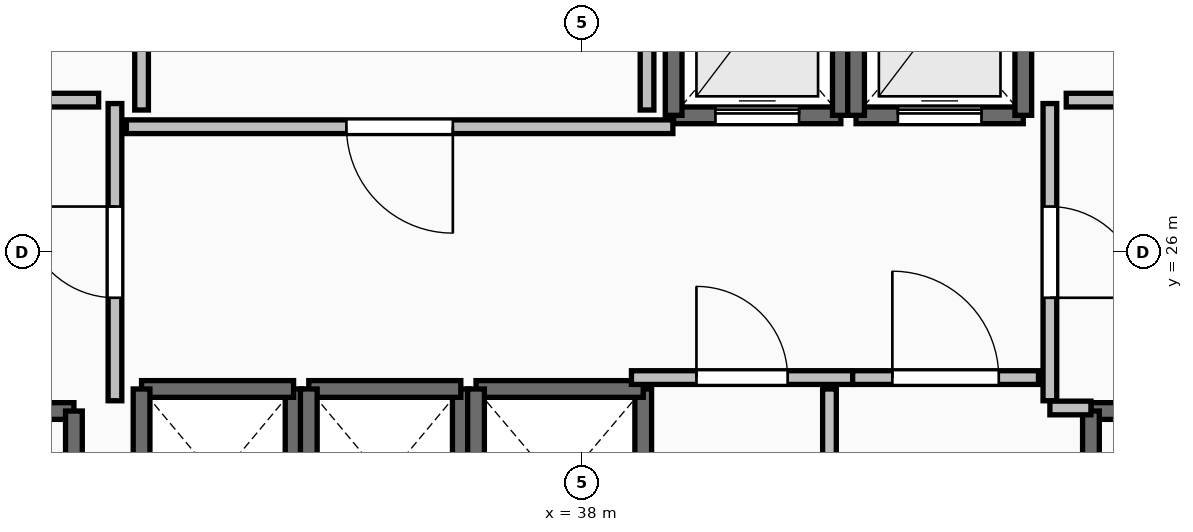
"""IFC4 building model, lengths in metres.
Left out: names, types, materials, properties, quantities, classifications, styles, units other than length and angle.
Written with IfcOpenShell. Run it as: python <this file> out.ifc"""

import sys

from ifc_helpers import new_model, si_unit, direction, frame, frame_2d, origin, place, context, subcontext, project, spatial, rectangle, extrude, element, fill, save


model = new_model("IFC4")
c1 = context("Model", 3, precision=1e-05, world=origin(), true_north=direction((0.0, 1.0)))
c2 = subcontext(c1, "Body", "Model", "MODEL_VIEW")
j1 = project(units=[si_unit("LENGTHUNIT", "METRE"), si_unit("PLANEANGLEUNIT", "RADIAN")], contexts=[c1])
p1 = place(None, origin())
s1 = spatial("IfcSite", under=j1, at=p1, CompositionType="ELEMENT")
p2 = place(p1, origin())
s2 = spatial("IfcBuilding", under=s1, at=p2, CompositionType="ELEMENT")
p3 = place(p2, frame((0.0, 0.0, 224.95)))
s3 = spatial("IfcBuildingStorey", under=s2, at=p3, CompositionType="ELEMENT", Elevation=224.95)
p4 = place(p3, frame((27.94, 23.91, 0.0), z_axis=(0.0, 0.0, 1.0), x_axis=(1.0, 0.0, 0.0)))
e1 = element("IfcWall", 1, at=p4, inside=s3, PredefinedType="SOLIDWALL", context=c2, shape_type="SweptSolid", body=[
    extrude(rectangle(XDim=3.37, YDim=0.22, at=frame_2d((1.685, 0.0))), origin(), (0.0, 0.0, 1.0), 4.5),
])
p5 = place(p4, frame((1.135, 0.0, 0.0)))
e2 = element("IfcOpeningElement", 2, at=p5, cuts=e1, PredefinedType="OPENING", context=c2, shape_type="SweptSolid", body=[
    extrude(rectangle(XDim=1.1, YDim=2.15, at=frame_2d((0.55, 1.075))), frame((0.0, 0.125, 0.0), z_axis=(0.0, -1.0, 0.0), x_axis=(1.0, 0.0, 0.0)), (0.0, 0.0, 1.0), 0.25),
])
p6 = place(p3, frame((31.31, 23.91, 0.0), z_axis=(0.0, 0.0, 1.0), x_axis=(0.0, -1.0, 0.0)))
e3 = element("IfcWall", 3, at=p6, inside=s3, PredefinedType="SOLIDWALL", context=c2, shape_type="SweptSolid", body=[
    extrude(rectangle(XDim=7.42, YDim=0.22, at=frame_2d((3.71, 0.0))), origin(), (0.0, 0.0, 1.0), 4.5),
])
p7 = place(p3, frame((44.69, 23.91, 0.0), z_axis=(0.0, 0.0, 1.0), x_axis=(1.0, 0.0, 0.0)))
e4 = element("IfcWall", 4, at=p7, inside=s3, PredefinedType="SOLIDWALL", context=c2, shape_type="SweptSolid", body=[
    extrude(rectangle(XDim=3.37, YDim=0.22, at=frame_2d((1.685, 0.0))), origin(), (0.0, 0.0, 1.0), 4.5),
])
p8 = place(p7, frame((1.135, 0.0, 0.0)))
e5 = element("IfcOpeningElement", 5, at=p8, cuts=e4, PredefinedType="OPENING", context=c2, shape_type="SweptSolid", body=[
    extrude(rectangle(XDim=1.1, YDim=2.15, at=frame_2d((0.55, 1.075))), frame((0.0, 0.125, 0.0), z_axis=(0.0, -1.0, 0.0), x_axis=(1.0, 0.0, 0.0)), (0.0, 0.0, 1.0), 0.25),
])
p9 = place(p3, frame((44.69, 16.49, 0.0), z_axis=(0.0, 0.0, 1.0), x_axis=(0.0, 1.0, 0.0)))
e6 = element("IfcWall", 6, at=p9, inside=s3, PredefinedType="SOLIDWALL", context=c2, shape_type="SweptSolid", body=[
    extrude(rectangle(XDim=7.42, YDim=0.22, at=frame_2d((3.71, 0.0))), origin(), (0.0, 0.0, 1.0), 4.5),
])
p10 = place(p3, frame((34.2, 21.8, 0.0), z_axis=(0.0, 0.0, 1.0), x_axis=(0.0, 1.0, 0.0)))
e7 = element("IfcWall", 7, at=p10, inside=s3, PredefinedType="SOLIDWALL", context=c2, shape_type="SweptSolid", body=[
    extrude(rectangle(XDim=2.4, YDim=0.22, at=frame_2d((1.2, 0.0))), origin(), (0.0, 0.0, 1.0), 4.5),
])
p11 = place(p3, frame((34.2, 24.2, 0.0), z_axis=(0.0, 0.0, 1.0), x_axis=(-1.0, 0.0, 0.0)))
e8 = element("IfcWall", 8, at=p11, inside=s3, PredefinedType="SOLIDWALL", context=c2, shape_type="SweptSolid", body=[
    extrude(rectangle(XDim=2.0, YDim=0.22, at=frame_2d((1.0, 0.0))), origin(), (0.0, 0.0, 1.0), 4.5),
])
for number, where, z_axis, x_axis in (
    (9, (32.2, 24.2, 0.0), (0.0, 0.0, 1.0), (0.0, -1.0, 0.0)),
    (10, (36.4, 21.8, 0.0), (0.0, 0.0, 1.0), (0.0, 1.0, 0.0)),
):
    element("IfcWall", number, at=place(p3, frame(where, z_axis=z_axis, x_axis=x_axis)), inside=s3, PredefinedType="SOLIDWALL", context=c2, shape_type="SweptSolid", body=[
        extrude(rectangle(XDim=2.4, YDim=0.22, at=frame_2d((1.2, 0.0))), origin(), (0.0, 0.0, 1.0), 4.5),
    ])
p12 = place(p3, frame((36.4, 24.2, 0.0), z_axis=(0.0, 0.0, 1.0), x_axis=(-1.0, 0.0, 0.0)))
e11 = element("IfcWall", 11, at=p12, inside=s3, PredefinedType="SOLIDWALL", context=c2, shape_type="SweptSolid", body=[
    extrude(rectangle(XDim=2.0, YDim=0.22, at=frame_2d((1.0, 0.0))), origin(), (0.0, 0.0, 1.0), 4.5),
])
p13 = place(p3, frame((34.4, 24.2, 0.0), z_axis=(0.0, 0.0, 1.0), x_axis=(0.0, -1.0, 0.0)))
e12 = element("IfcWall", 12, at=p13, inside=s3, PredefinedType="SOLIDWALL", context=c2, shape_type="SweptSolid", body=[
    extrude(rectangle(XDim=2.4, YDim=0.22, at=frame_2d((1.2, 0.0))), origin(), (0.0, 0.0, 1.0), 4.5),
])
p14 = place(p3, frame((38.8, 21.6, 0.0), z_axis=(0.0, 0.0, 1.0), x_axis=(0.0, 1.0, 0.0)))
e13 = element("IfcWall", 13, at=p14, inside=s3, PredefinedType="SOLIDWALL", context=c2, shape_type="SweptSolid", body=[
    extrude(rectangle(XDim=2.6, YDim=0.22, at=frame_2d((1.3, 0.0))), origin(), (0.0, 0.0, 1.0), 4.5),
])
p15 = place(p3, frame((38.8, 24.2, 0.0), z_axis=(0.0, 0.0, 1.0), x_axis=(-1.0, 0.0, 0.0)))
e14 = element("IfcWall", 14, at=p15, inside=s3, PredefinedType="SOLIDWALL", context=c2, shape_type="SweptSolid", body=[
    extrude(rectangle(XDim=2.2, YDim=0.22, at=frame_2d((1.1, 0.0))), origin(), (0.0, 0.0, 1.0), 4.5),
])
p16 = place(p3, frame((36.6, 24.2, 0.0), z_axis=(0.0, 0.0, 1.0), x_axis=(0.0, -1.0, 0.0)))
e15 = element("IfcWall", 15, at=p16, inside=s3, PredefinedType="SOLIDWALL", context=c2, shape_type="SweptSolid", body=[
    extrude(rectangle(XDim=2.6, YDim=0.22, at=frame_2d((1.3, 0.0))), origin(), (0.0, 0.0, 1.0), 4.5),
])
p17 = place(p3, frame((39.2, 27.8, 0.0), z_axis=(0.0, 0.0, 1.0), x_axis=(1.0, 0.0, 0.0)))
e16 = element("IfcWall", 16, at=p17, inside=s3, PredefinedType="SOLIDWALL", context=c2, shape_type="SweptSolid", body=[
    extrude(rectangle(XDim=2.2, YDim=0.22, at=frame_2d((1.1, 0.0))), origin(), (0.0, 0.0, 1.0), 4.5),
])
p18 = place(p17, frame((0.55, 0.0, 0.0)))
e17 = element("IfcOpeningElement", 17, at=p18, cuts=e16, PredefinedType="OPENING", context=c2, shape_type="SweptSolid", body=[
    extrude(rectangle(XDim=1.1, YDim=2.2, at=frame_2d((0.55, 1.1))), frame((0.0, 0.125, 0.0), z_axis=(0.0, -1.0, 0.0), x_axis=(1.0, 0.0, 0.0)), (0.0, 0.0, 1.0), 0.25),
])
for number, where, z_axis, x_axis in (
    (18, (41.4, 27.8, 0.0), (0.0, 0.0, 1.0), (0.0, 1.0, 0.0)),
    (19, (39.2, 30.4, 0.0), (0.0, 0.0, 1.0), (0.0, -1.0, 0.0)),
):
    element("IfcWall", number, at=place(p3, frame(where, z_axis=z_axis, x_axis=x_axis)), inside=s3, PredefinedType="SOLIDWALL", context=c2, shape_type="SweptSolid", body=[
        extrude(rectangle(XDim=2.6, YDim=0.22, at=frame_2d((1.3, 0.0))), origin(), (0.0, 0.0, 1.0), 4.5),
    ])
p19 = place(p3, frame((41.6, 27.8, 0.0), z_axis=(0.0, 0.0, 1.0), x_axis=(1.0, 0.0, 0.0)))
e20 = element("IfcWall", 20, at=p19, inside=s3, PredefinedType="SOLIDWALL", context=c2, shape_type="SweptSolid", body=[
    extrude(rectangle(XDim=2.2, YDim=0.22, at=frame_2d((1.1, 0.0))), origin(), (0.0, 0.0, 1.0), 4.5),
])
p20 = place(p19, frame((0.55, 0.0, 0.0)))
e21 = element("IfcOpeningElement", 21, at=p20, cuts=e20, PredefinedType="OPENING", context=c2, shape_type="SweptSolid", body=[
    extrude(rectangle(XDim=1.1, YDim=2.2, at=frame_2d((0.55, 1.1))), frame((0.0, 0.125, 0.0), z_axis=(0.0, -1.0, 0.0), x_axis=(1.0, 0.0, 0.0)), (0.0, 0.0, 1.0), 0.25),
])
for number, where, z_axis, x_axis in (
    (22, (43.8, 27.8, 0.0), (0.0, 0.0, 1.0), (0.0, 1.0, 0.0)),
    (23, (41.6, 30.4, 0.0), (0.0, 0.0, 1.0), (0.0, -1.0, 0.0)),
):
    element("IfcWall", number, at=place(p3, frame(where, z_axis=z_axis, x_axis=x_axis)), inside=s3, PredefinedType="SOLIDWALL", context=c2, shape_type="SweptSolid", body=[
        extrude(rectangle(XDim=2.6, YDim=0.22, at=frame_2d((1.3, 0.0))), origin(), (0.0, 0.0, 1.0), 4.5),
    ])
p21 = place(p3, frame((31.85, 24.045, 0.0), z_axis=(0.0, 0.0, 1.0), x_axis=(0.0, 1.0, 0.0)))
e24 = element("IfcWall", 24, at=p21, inside=s3, PredefinedType="PARTITIONING", context=c2, shape_type="SweptSolid", body=[
    extrude(rectangle(XDim=3.91, YDim=0.18, at=frame_2d((1.955, 0.0))), origin(), (0.0, 0.0, 1.0), 4.5),
])
p22 = place(p21, frame((1.355, 0.0, 0.0)))
e25 = element("IfcOpeningElement", 25, at=p22, cuts=e24, PredefinedType="OPENING", context=c2, shape_type="SweptSolid", body=[
    extrude(rectangle(XDim=1.2, YDim=2.15, at=frame_2d((0.6, 1.075))), frame((0.0, 0.105, 0.0), z_axis=(0.0, -1.0, 0.0), x_axis=(1.0, 0.0, 0.0)), (0.0, 0.0, 1.0), 0.21),
])
p23 = place(p3, frame((44.15, 27.955, 0.0), z_axis=(0.0, 0.0, 1.0), x_axis=(0.0, -1.0, 0.0)))
e26 = element("IfcWall", 26, at=p23, inside=s3, PredefinedType="PARTITIONING", context=c2, shape_type="SweptSolid", body=[
    extrude(rectangle(XDim=3.91, YDim=0.18, at=frame_2d((1.955, 0.0))), origin(), (0.0, 0.0, 1.0), 4.5),
])
p24 = place(p23, frame((1.355, 0.0, 0.0)))
e27 = element("IfcOpeningElement", 27, at=p24, cuts=e26, PredefinedType="OPENING", context=c2, shape_type="SweptSolid", body=[
    extrude(rectangle(XDim=1.2, YDim=2.15, at=frame_2d((0.6, 1.075))), frame((0.0, 0.105, 0.0), z_axis=(0.0, -1.0, 0.0), x_axis=(1.0, 0.0, 0.0)), (0.0, 0.0, 1.0), 0.21),
])
p25 = place(p3, frame((44.15, 23.95, 0.0), z_axis=(0.0, 0.0, 1.0), x_axis=(1.0, 0.0, 0.0)))
e28 = element("IfcWall", 28, at=p25, inside=s3, PredefinedType="PARTITIONING", context=c2, shape_type="SweptSolid", body=[
    extrude(rectangle(XDim=0.54, YDim=0.18, at=frame_2d((0.27, 0.0))), origin(), (0.0, 0.0, 1.0), 4.5),
])
p26 = place(p3, frame((38.645, 24.35, 0.0), z_axis=(0.0, 0.0, 1.0), x_axis=(1.0, 0.0, 0.0)))
e29 = element("IfcWall", 29, at=p26, inside=s3, PredefinedType="PARTITIONING", context=c2, shape_type="SweptSolid", body=[
    extrude(rectangle(XDim=2.91, YDim=0.18, at=frame_2d((1.455, 0.0))), origin(), (0.0, 0.0, 1.0), 4.5),
])
p27 = place(p26, frame((0.855, 0.0, 0.0)))
e30 = element("IfcOpeningElement", 30, at=p27, cuts=e29, PredefinedType="OPENING", context=c2, shape_type="SweptSolid", body=[
    extrude(rectangle(XDim=1.2, YDim=2.15, at=frame_2d((0.6, 1.075))), frame((0.0, 0.105, 0.0), z_axis=(0.0, -1.0, 0.0), x_axis=(1.0, 0.0, 0.0)), (0.0, 0.0, 1.0), 0.21),
])
p28 = place(p3, frame((41.555, 24.35, 0.0), z_axis=(0.0, 0.0, 1.0), x_axis=(1.0, 0.0, 0.0)))
e31 = element("IfcWall", 31, at=p28, inside=s3, PredefinedType="PARTITIONING", context=c2, shape_type="SweptSolid", body=[
    extrude(rectangle(XDim=2.445, YDim=0.18, at=frame_2d((1.223, 0.0))), origin(), (0.0, 0.0, 1.0), 4.5),
])
p29 = place(p28, frame((0.522, 0.0, 0.0)))
e32 = element("IfcOpeningElement", 32, at=p29, cuts=e31, PredefinedType="OPENING", context=c2, shape_type="SweptSolid", body=[
    extrude(rectangle(XDim=1.4, YDim=2.2, at=frame_2d((0.7, 1.1))), frame((0.0, 0.105, 0.0), z_axis=(0.0, -1.0, 0.0), x_axis=(1.0, 0.0, 0.0)), (0.0, 0.0, 1.0), 0.21),
])
p30 = place(p3, frame((39.19, 27.65, 0.0), z_axis=(0.0, 0.0, 1.0), x_axis=(-1.0, 0.0, 0.0)))
e33 = element("IfcWall", 33, at=p30, inside=s3, PredefinedType="PARTITIONING", context=c2, shape_type="SweptSolid", body=[
    extrude(rectangle(XDim=7.19, YDim=0.18, at=frame_2d((3.595, 0.0))), origin(), (0.0, 0.0, 1.0), 4.5),
])
p31 = place(p30, frame((2.895, 0.0, 0.0)))
e34 = element("IfcOpeningElement", 34, at=p31, cuts=e33, PredefinedType="OPENING", context=c2, shape_type="SweptSolid", body=[
    extrude(rectangle(XDim=1.4, YDim=2.2, at=frame_2d((0.7, 1.1))), frame((0.0, 0.105, 0.0), z_axis=(0.0, -1.0, 0.0), x_axis=(1.0, 0.0, 0.0)), (0.0, 0.0, 1.0), 0.21),
])
p32 = place(p3, frame((41.25, 19.105, 0.0), z_axis=(0.0, 0.0, 1.0), x_axis=(0.0, 1.0, 0.0)))
e35 = element("IfcWall", 35, at=p32, inside=s3, PredefinedType="PARTITIONING", context=c2, shape_type="SweptSolid", body=[
    extrude(rectangle(XDim=5.095, YDim=0.18, at=frame_2d((2.547, 0.0))), origin(), (0.0, 0.0, 1.0), 3.482),
])
p33 = place(p32, frame((1.847, 0.0, 0.0)))
e36 = element("IfcOpeningElement", 36, at=p33, cuts=e35, PredefinedType="OPENING", context=c2, shape_type="SweptSolid", body=[
    extrude(rectangle(XDim=1.4, YDim=2.2, at=frame_2d((0.7, 1.1))), frame((0.0, 0.105, 0.0), z_axis=(0.0, -1.0, 0.0), x_axis=(1.0, 0.0, 0.0)), (0.0, 0.0, 1.0), 0.21),
])
for number, where, z_axis, x_axis in (
    (37, (31.635, 28.0, 0.0), (0.0, 0.0, 1.0), (-1.0, 0.0, 0.0)),
    (38, (45.28, 28.0, 0.0), (0.0, 0.0, 1.0), (-1.0, 0.0, 0.0)),
):
    element("IfcWall", number, at=place(p3, frame(where, z_axis=z_axis, x_axis=x_axis)), inside=s3, PredefinedType="PARTITIONING", context=c2, shape_type="SweptSolid", body=[
        extrude(rectangle(XDim=0.915, YDim=0.18, at=frame_2d((0.458, 0.0))), origin(), (0.0, 0.0, 1.0), 4.5),
    ])
p34 = place(p3, frame((32.2, 30.26, 0.0), z_axis=(0.0, 0.0, 1.0), x_axis=(0.0, -1.0, 0.0)))
e39 = element("IfcWall", 39, at=p34, inside=s3, PredefinedType="PARTITIONING", context=c2, shape_type="SweptSolid", body=[
    extrude(rectangle(XDim=2.39, YDim=0.18, at=frame_2d((1.195, 0.0))), origin(), (0.0, 0.0, 1.0), 4.5),
])
p35 = place(p3, frame((38.85, 27.87, 0.0), z_axis=(0.0, 0.0, 1.0), x_axis=(0.0, 1.0, 0.0)))
e40 = element("IfcWall", 40, at=p35, inside=s3, PredefinedType="PARTITIONING", context=c2, shape_type="SweptSolid", body=[
    extrude(rectangle(XDim=2.466, YDim=0.18, at=frame_2d((1.233, 0.0))), origin(), (0.0, 0.0, 1.0), 3.482),
])
p36 = place(p18, origin())
e41 = element("IfcDoor", 41, at=p36, inside=s3, OperationType="SLIDING_TO_LEFT", PredefinedType="DOOR", context=c2, shape_type="SweptSolid", body=[
    extrude(rectangle(XDim=1.1, YDim=2.2, at=frame_2d((0.55, 1.1))), frame((0.0, 0.025, 0.0), z_axis=(0.0, -1.0, 0.0), x_axis=(1.0, 0.0, 0.0)), (0.0, 0.0, 1.0), 0.05),
])
fill(e17, e41)
p37 = place(p20, origin())
e42 = element("IfcDoor", 42, at=p37, inside=s3, OperationType="SLIDING_TO_LEFT", PredefinedType="DOOR", context=c2, shape_type="SweptSolid", body=[
    extrude(rectangle(XDim=1.1, YDim=2.2, at=frame_2d((0.55, 1.1))), frame((0.0, 0.025, 0.0), z_axis=(0.0, -1.0, 0.0), x_axis=(1.0, 0.0, 0.0)), (0.0, 0.0, 1.0), 0.05),
])
fill(e21, e42)
p38 = place(p22, origin())
e43 = element("IfcDoor", 43, at=p38, inside=s3, OperationType="SINGLE_SWING_RIGHT", PredefinedType="DOOR", context=c2, shape_type="SweptSolid", body=[
    extrude(rectangle(XDim=1.2, YDim=2.15, at=frame_2d((0.6, 1.075))), frame((0.0, 0.025, 0.0), z_axis=(0.0, -1.0, 0.0), x_axis=(1.0, 0.0, 0.0)), (0.0, 0.0, 1.0), 0.05),
])
fill(e25, e43)
p39 = place(p24, origin())
e44 = element("IfcDoor", 44, at=p39, inside=s3, OperationType="SINGLE_SWING_RIGHT", PredefinedType="DOOR", context=c2, shape_type="SweptSolid", body=[
    extrude(rectangle(XDim=1.2, YDim=2.15, at=frame_2d((0.6, 1.075))), frame((0.0, 0.025, 0.0), z_axis=(0.0, -1.0, 0.0), x_axis=(1.0, 0.0, 0.0)), (0.0, 0.0, 1.0), 0.05),
])
fill(e27, e44)
p40 = place(p27, origin())
e45 = element("IfcDoor", 45, at=p40, inside=s3, OperationType="SINGLE_SWING_LEFT", PredefinedType="DOOR", context=c2, shape_type="SweptSolid", body=[
    extrude(rectangle(XDim=1.2, YDim=2.15, at=frame_2d((0.6, 1.075))), frame((0.0, 0.025, 0.0), z_axis=(0.0, -1.0, 0.0), x_axis=(1.0, 0.0, 0.0)), (0.0, 0.0, 1.0), 0.05),
])
fill(e30, e45)
p41 = place(p29, origin())
e46 = element("IfcDoor", 46, at=p41, inside=s3, OperationType="DOUBLE_SWING_LEFT", PredefinedType="DOOR", context=c2, shape_type="SweptSolid", body=[
    extrude(rectangle(XDim=1.4, YDim=2.2, at=frame_2d((0.7, 1.1))), frame((0.0, 0.025, 0.0), z_axis=(0.0, -1.0, 0.0), x_axis=(1.0, 0.0, 0.0)), (0.0, 0.0, 1.0), 0.05),
])
fill(e32, e46)
p42 = place(p31, origin())
e47 = element("IfcDoor", 47, at=p42, inside=s3, OperationType="DOUBLE_SWING_LEFT", PredefinedType="DOOR", context=c2, shape_type="SweptSolid", body=[
    extrude(rectangle(XDim=1.4, YDim=2.2, at=frame_2d((0.7, 1.1))), frame((0.0, 0.025, 0.0), z_axis=(0.0, -1.0, 0.0), x_axis=(1.0, 0.0, 0.0)), (0.0, 0.0, 1.0), 0.05),
])
fill(e34, e47)
save(model, sys.argv[1])
